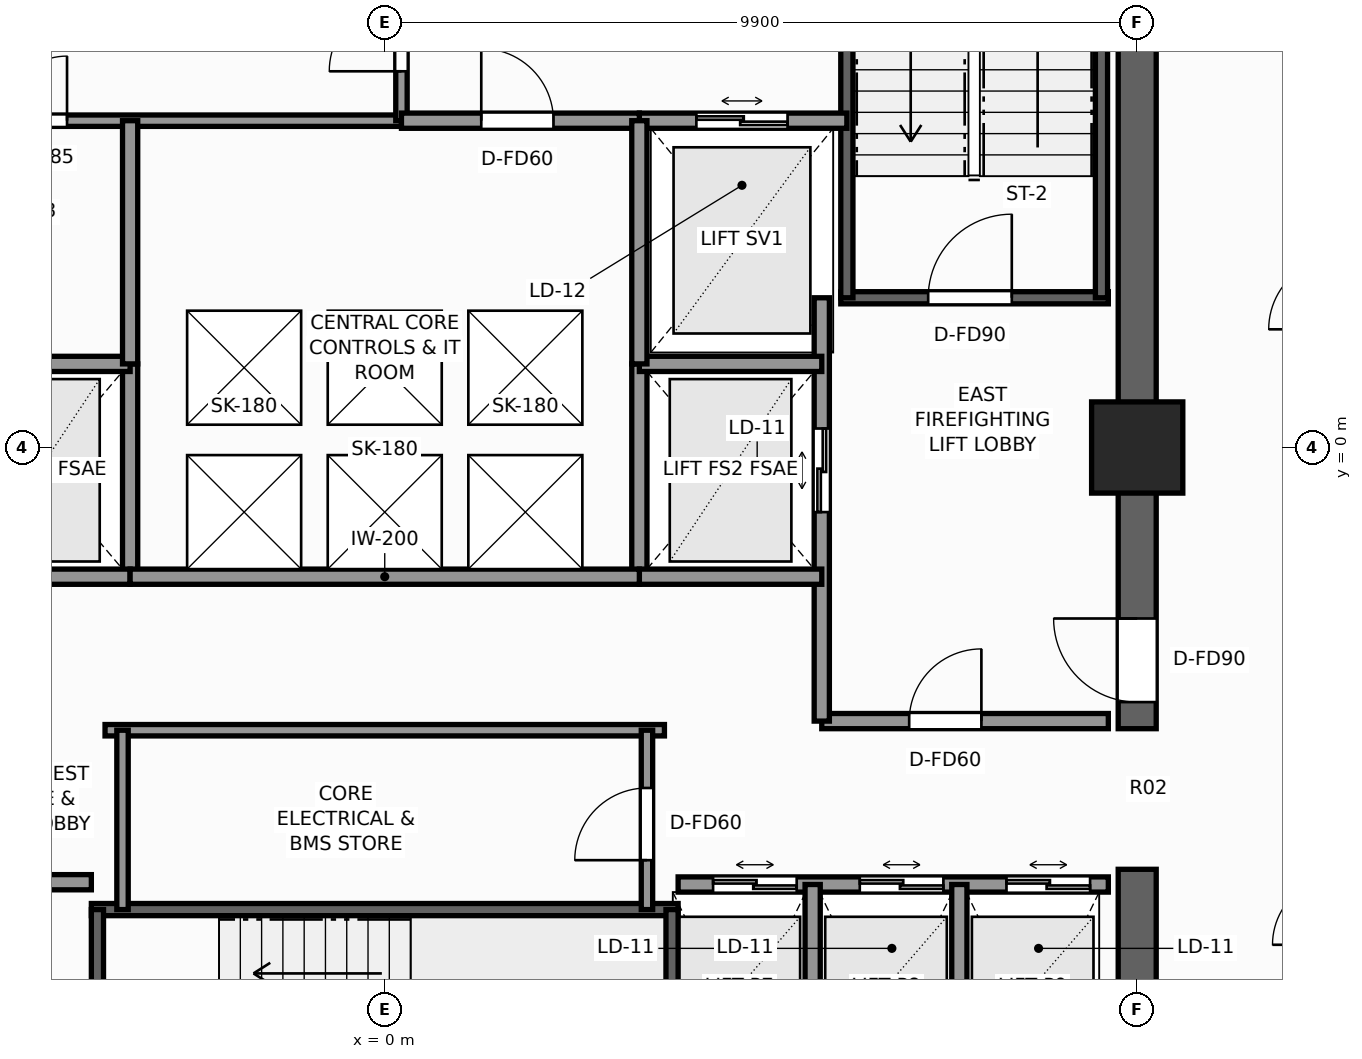
"""IFC4 building model, lengths in metres.
Left out: names, types, materials, properties, quantities, classifications, styles, units other than length and angle.
Written with IfcOpenShell. Run it as: python <this file> out.ifc"""

import sys

from ifc_helpers import new_model, si_unit, direction, frame, frame_2d, origin, origin_2d, place, context, subcontext, project, spatial, rectangle, extrude, element, fill, save


model = new_model("IFC4")
c1 = context("Model", 3, precision=1e-05, world=origin(), true_north=direction((0.0, 1.0)))
c2 = subcontext(c1, "Body", "Model", "MODEL_VIEW")
j1 = project(units=[si_unit("LENGTHUNIT", "METRE"), si_unit("PLANEANGLEUNIT", "RADIAN")], contexts=[c1])
p1 = place(None, origin())
s1 = spatial("IfcSite", under=j1, at=p1, CompositionType="ELEMENT")
p2 = place(p1, origin())
s2 = spatial("IfcBuilding", under=s1, at=p2, CompositionType="ELEMENT")
p3 = place(p2, frame((0.0, 0.0, 189.9)))
s3 = spatial("IfcBuildingStorey", under=s2, at=p3, CompositionType="ELEMENT", Elevation=189.9)
p4 = place(p3, frame((9.9, -9.65, 0.0), z_axis=(0.0, 0.0, 1.0), x_axis=(0.0, 1.0, 0.0)))
e1 = element("IfcWall", 1, at=p4, inside=s3, PredefinedType="SHEAR", context=c2, shape_type="SweptSolid", body=[
    extrude(rectangle(XDim=4.1, YDim=0.5, at=frame_2d((2.05, 0.0))), origin(), (0.0, 0.0, 1.0), 3.3),
])
p5 = place(p3, frame((9.9, -3.7, 0.0), z_axis=(0.0, 0.0, 1.0), x_axis=(0.0, 1.0, 0.0)))
e2 = element("IfcWall", 2, at=p5, inside=s3, PredefinedType="SHEAR", context=c2, shape_type="SweptSolid", body=[
    extrude(rectangle(XDim=13.35, YDim=0.5, at=frame_2d((6.675, 0.0))), origin(), (0.0, 0.0, 1.0), 3.3),
])
p6 = place(p5, frame((0.35, 0.0, 0.0)))
e3 = element("IfcOpeningElement", 3, at=p6, cuts=e2, PredefinedType="OPENING", context=c2, shape_type="SweptSolid", body=[
    extrude(rectangle(XDim=1.1, YDim=2.2, at=frame_2d((0.55, 1.1))), frame((0.0, 0.26, 0.0), z_axis=(0.0, -1.0, 0.0), x_axis=(1.0, 0.0, 0.0)), (0.0, 0.0, 1.0), 0.52),
])
p7 = place(p3, frame((9.9, 0.0, 0.0), z_axis=(0.0, 0.0, 1.0), x_axis=(1.0, 0.0, 0.0)))
e4 = element("IfcColumn", 4, at=p7, inside=s3, PredefinedType="COLUMN", context=c2, shape_type="SweptSolid", body=[
    extrude(rectangle(XDim=1.2, YDim=1.2, at=origin_2d()), origin(), (0.0, 0.0, 1.0), 3.3),
])
p8 = place(p3, frame((6.0, 1.97, 0.0), z_axis=(0.0, 0.0, 1.0), x_axis=(1.0, 0.0, 0.0)))
e5 = element("IfcWall", 5, at=p8, inside=s3, PredefinedType="SHEAR", context=c2, shape_type="SweptSolid", body=[
    extrude(rectangle(XDim=3.52, YDim=0.16, at=frame_2d((1.76, 0.0))), origin(), (0.0, 0.0, 1.0), 3.3),
])
p9 = place(p8, frame((1.15, 0.0, 0.0)))
e6 = element("IfcOpeningElement", 6, at=p9, cuts=e5, PredefinedType="OPENING", context=c2, shape_type="SweptSolid", body=[
    extrude(rectangle(XDim=1.1, YDim=2.2, at=frame_2d((0.55, 1.1))), frame((0.0, 0.09, 0.0), z_axis=(0.0, -1.0, 0.0), x_axis=(1.0, 0.0, 0.0)), (0.0, 0.0, 1.0), 0.18),
])
for number, where, z_axis, x_axis in (
    (7, (6.08, 1.97, 0.0), (0.0, 0.0, 1.0), (0.0, 1.0, 0.0)),
    (8, (9.43, 1.97, 0.0), (0.0, 0.0, 1.0), (0.0, 1.0, 0.0)),
):
    element("IfcWall", number, at=place(p3, frame(where, z_axis=z_axis, x_axis=x_axis)), inside=s3, PredefinedType="SHEAR", context=c2, shape_type="SweptSolid", body=[
        extrude(rectangle(XDim=7.56, YDim=0.16, at=frame_2d((3.78, 0.0))), origin(), (0.0, 0.0, 1.0), 3.3),
    ])
p10 = place(p3, frame((-3.86, -6.08, 0.0), z_axis=(0.0, 0.0, 1.0), x_axis=(1.0, 0.0, 0.0)))
e9 = element("IfcWall", 9, at=p10, inside=s3, PredefinedType="SHEAR", context=c2, shape_type="SweptSolid", body=[
    extrude(rectangle(XDim=7.72, YDim=0.16, at=frame_2d((3.86, 0.0))), origin(), (0.0, 0.0, 1.0), 3.3),
])
for number, where, z_axis, x_axis in (
    (10, (-3.78, -9.43, 0.0), (0.0, 0.0, 1.0), (0.0, 1.0, 0.0)),
    (11, (3.78, -9.43, 0.0), (0.0, 0.0, 1.0), (0.0, 1.0, 0.0)),
):
    element("IfcWall", number, at=place(p3, frame(where, z_axis=z_axis, x_axis=x_axis)), inside=s3, PredefinedType="SHEAR", context=c2, shape_type="SweptSolid", body=[
        extrude(rectangle(XDim=3.35, YDim=0.16, at=frame_2d((1.675, 0.0))), origin(), (0.0, 0.0, 1.0), 3.3),
    ])
p11 = place(p3, frame((-3.35, -1.7, 0.0), z_axis=(0.0, 0.0, 1.0), x_axis=(0.0, 1.0, 0.0)))
e12 = element("IfcWall", 12, at=p11, inside=s3, PredefinedType="SOLIDWALL", context=c2, shape_type="SweptSolid", body=[
    extrude(rectangle(XDim=2.8, YDim=0.2, at=frame_2d((1.4, 0.0))), origin(), (0.0, 0.0, 1.0), 2.715),
])
for number, where, z_axis, x_axis in (
    (13, (-5.75, -1.7, 0.0), (0.0, 0.0, 1.0), (1.0, 0.0, 0.0)),
    (14, (-5.75, 1.1, 0.0), (0.0, 0.0, 1.0), (1.0, 0.0, 0.0)),
):
    element("IfcWall", number, at=place(p3, frame(where, z_axis=z_axis, x_axis=x_axis)), inside=s3, PredefinedType="SOLIDWALL", context=c2, shape_type="SweptSolid", body=[
        extrude(rectangle(XDim=2.4, YDim=0.2, at=frame_2d((1.2, 0.0))), origin(), (0.0, 0.0, 1.0), 3.08),
    ])
p12 = place(p3, frame((5.75, -3.6, 0.0), z_axis=(0.0, 0.0, 1.0), x_axis=(1.0, 0.0, 0.0)))
e15 = element("IfcWall", 15, at=p12, inside=s3, PredefinedType="SOLIDWALL", context=c2, shape_type="SweptSolid", body=[
    extrude(rectangle(XDim=3.77, YDim=0.2, at=frame_2d((1.885, 0.0))), origin(), (0.0, 0.0, 1.0), 3.08),
])
p13 = place(p12, frame((1.15, 0.0, 0.0)))
e16 = element("IfcOpeningElement", 16, at=p13, cuts=e15, PredefinedType="OPENING", context=c2, shape_type="SweptSolid", body=[
    extrude(rectangle(XDim=0.95, YDim=2.06, at=frame_2d((0.475, 1.03))), frame((0.0, 0.11, 0.0), z_axis=(0.0, -1.0, 0.0), x_axis=(1.0, 0.0, 0.0)), (0.0, 0.0, 1.0), 0.22),
])
p14 = place(p3, frame((5.75, -3.6, 0.0), z_axis=(0.0, 0.0, 1.0), x_axis=(0.0, 1.0, 0.0)))
e17 = element("IfcWall", 17, at=p14, inside=s3, PredefinedType="SOLIDWALL", context=c2, shape_type="SweptSolid", body=[
    extrude(rectangle(XDim=5.57, YDim=0.2, at=frame_2d((2.785, 0.0))), origin(), (0.0, 0.0, 1.0), 2.715),
])
p15 = place(p14, frame((2.75, 0.0, 0.0)))
e18 = element("IfcOpeningElement", 18, at=p15, cuts=e17, PredefinedType="OPENING", context=c2, shape_type="SweptSolid", body=[
    extrude(rectangle(XDim=1.1, YDim=2.2, at=frame_2d((0.55, 1.1))), frame((0.0, 0.11, 0.0), z_axis=(0.0, -1.0, 0.0), x_axis=(1.0, 0.0, 0.0)), (0.0, 0.0, 1.0), 0.22),
])
p16 = place(p3, frame((3.35, -1.7, 0.0), z_axis=(0.0, 0.0, 1.0), x_axis=(0.0, 1.0, 0.0)))
e19 = element("IfcWall", 19, at=p16, inside=s3, PredefinedType="SOLIDWALL", context=c2, shape_type="SweptSolid", body=[
    extrude(rectangle(XDim=2.8, YDim=0.2, at=frame_2d((1.4, 0.0))), origin(), (0.0, 0.0, 1.0), 2.715),
])
for number, where, z_axis, x_axis in (
    (20, (3.35, -1.7, 0.0), (0.0, 0.0, 1.0), (1.0, 0.0, 0.0)),
    (21, (3.35, 1.1, 0.0), (0.0, 0.0, 1.0), (1.0, 0.0, 0.0)),
):
    element("IfcWall", number, at=place(p3, frame(where, z_axis=z_axis, x_axis=x_axis)), inside=s3, PredefinedType="SOLIDWALL", context=c2, shape_type="SweptSolid", body=[
        extrude(rectangle(XDim=2.4, YDim=0.2, at=frame_2d((1.2, 0.0))), origin(), (0.0, 0.0, 1.0), 3.08),
    ])
p17 = place(p3, frame((3.35, 4.3, 0.0), z_axis=(0.0, 0.0, 1.0), x_axis=(1.0, 0.0, 0.0)))
e22 = element("IfcWall", 22, at=p17, inside=s3, PredefinedType="SOLIDWALL", context=c2, shape_type="SweptSolid", body=[
    extrude(rectangle(XDim=2.73, YDim=0.2, at=frame_2d((1.365, 0.0))), origin(), (0.0, 0.0, 1.0), 3.08),
])
p18 = place(p17, frame((0.75, 0.0, 0.0)))
e23 = element("IfcOpeningElement", 23, at=p18, cuts=e22, PredefinedType="OPENING", context=c2, shape_type="SweptSolid", body=[
    extrude(rectangle(XDim=1.2, YDim=2.25, at=frame_2d((0.6, 1.125))), frame((0.0, 0.11, 0.0), z_axis=(0.0, -1.0, 0.0), x_axis=(1.0, 0.0, 0.0)), (0.0, 0.0, 1.0), 0.22),
])
p19 = place(p3, frame((-6.08, 4.3, 0.0), z_axis=(0.0, 0.0, 1.0), x_axis=(1.0, 0.0, 0.0)))
e24 = element("IfcWall", 24, at=p19, inside=s3, PredefinedType="PARTITIONING", context=c2, shape_type="SweptSolid", body=[
    extrude(rectangle(XDim=6.3, YDim=0.15, at=frame_2d((3.15, 0.0))), origin(), (0.0, 0.0, 1.0), 3.08),
])
p20 = place(p19, frame((1.05, 0.0, 0.0)))
e25 = element("IfcOpeningElement", 25, at=p20, cuts=e24, PredefinedType="OPENING", context=c2, shape_type="SweptSolid", body=[
    extrude(rectangle(XDim=0.85, YDim=2.03, at=frame_2d((0.425, 1.015))), frame((0.0, 0.085, 0.0), z_axis=(0.0, -1.0, 0.0), x_axis=(1.0, 0.0, 0.0)), (0.0, 0.0, 1.0), 0.17),
])
p21 = place(p3, frame((0.22, 4.3, 0.0), z_axis=(0.0, 0.0, 1.0), x_axis=(0.0, 1.0, 0.0)))
e26 = element("IfcWall", 26, at=p21, inside=s3, PredefinedType="PARTITIONING", context=c2, shape_type="SweptSolid", body=[
    extrude(rectangle(XDim=5.22, YDim=0.15, at=frame_2d((2.61, 0.0))), origin(), (0.0, 0.0, 1.0), 3.08),
])
p22 = place(p21, frame((0.65, 0.0, 0.0)))
e27 = element("IfcOpeningElement", 27, at=p22, cuts=e26, PredefinedType="OPENING", context=c2, shape_type="SweptSolid", body=[
    extrude(rectangle(XDim=0.95, YDim=2.06, at=frame_2d((0.475, 1.03))), frame((0.0, 0.085, 0.0), z_axis=(0.0, -1.0, 0.0), x_axis=(1.0, 0.0, 0.0)), (0.0, 0.0, 1.0), 0.17),
])
p23 = place(p3, frame((-9.52, -5.72, 0.0), z_axis=(0.0, 0.0, 1.0), x_axis=(1.0, 0.0, 0.0)))
e28 = element("IfcWall", 28, at=p23, inside=s3, PredefinedType="SOLIDWALL", context=c2, shape_type="SweptSolid", body=[
    extrude(rectangle(XDim=5.66, YDim=0.2, at=frame_2d((2.83, 0.0))), origin(), (0.0, 0.0, 1.0), 3.08),
])
p24 = place(p23, frame((1.8, 0.0, 0.0)))
e29 = element("IfcOpeningElement", 29, at=p24, cuts=e28, PredefinedType="OPENING", context=c2, shape_type="SweptSolid", body=[
    extrude(rectangle(XDim=0.95, YDim=2.06, at=frame_2d((0.475, 1.03))), frame((0.0, 0.11, 0.0), z_axis=(0.0, -1.0, 0.0), x_axis=(1.0, 0.0, 0.0)), (0.0, 0.0, 1.0), 0.22),
])
p25 = place(p3, frame((3.86, -5.75, 0.0), z_axis=(0.0, 0.0, 1.0), x_axis=(1.0, 0.0, 0.0)))
e30 = element("IfcWall", 30, at=p25, inside=s3, PredefinedType="SOLIDWALL", context=c2, shape_type="SweptSolid", body=[
    extrude(rectangle(XDim=5.66, YDim=0.2, at=frame_2d((2.83, 0.0))), origin(), (0.0, 0.0, 1.0), 3.08),
])
p26 = place(p25, frame((0.46, 0.0, 0.0)))
e31 = element("IfcOpeningElement", 31, at=p26, cuts=e30, PredefinedType="OPENING", context=c2, shape_type="SweptSolid", body=[
    extrude(rectangle(XDim=1.1, YDim=2.2, at=frame_2d((0.55, 1.1))), frame((0.0, 0.11, 0.0), z_axis=(0.0, -1.0, 0.0), x_axis=(1.0, 0.0, 0.0)), (0.0, 0.0, 1.0), 0.22),
])
p27 = place(p25, frame((2.39, 0.0, 0.0)))
e32 = element("IfcOpeningElement", 32, at=p27, cuts=e30, PredefinedType="OPENING", context=c2, shape_type="SweptSolid", body=[
    extrude(rectangle(XDim=1.1, YDim=2.2, at=frame_2d((0.55, 1.1))), frame((0.0, 0.11, 0.0), z_axis=(0.0, -1.0, 0.0), x_axis=(1.0, 0.0, 0.0)), (0.0, 0.0, 1.0), 0.22),
])
p28 = place(p25, frame((4.32, 0.0, 0.0)))
e33 = element("IfcOpeningElement", 33, at=p28, cuts=e30, PredefinedType="OPENING", context=c2, shape_type="SweptSolid", body=[
    extrude(rectangle(XDim=1.1, YDim=2.2, at=frame_2d((0.55, 1.1))), frame((0.0, 0.11, 0.0), z_axis=(0.0, -1.0, 0.0), x_axis=(1.0, 0.0, 0.0)), (0.0, 0.0, 1.0), 0.22),
])
for number, where, z_axis, x_axis in (
    (34, (5.63, -9.52, 0.0), (0.0, 0.0, 1.0), (0.0, 1.0, 0.0)),
    (35, (7.56, -9.52, 0.0), (0.0, 0.0, 1.0), (0.0, 1.0, 0.0)),
):
    element("IfcWall", number, at=place(p3, frame(where, z_axis=z_axis, x_axis=x_axis)), inside=s3, PredefinedType="SOLIDWALL", context=c2, shape_type="SweptSolid", body=[
        extrude(rectangle(XDim=3.77, YDim=0.2, at=frame_2d((1.885, 0.0))), origin(), (0.0, 0.0, 1.0), 3.08),
    ])
p29 = place(p3, frame((0.22, 4.3, 0.0), z_axis=(0.0, 0.0, 1.0), x_axis=(1.0, 0.0, 0.0)))
e36 = element("IfcWall", 36, at=p29, inside=s3, PredefinedType="SOLIDWALL", context=c2, shape_type="SweptSolid", body=[
    extrude(rectangle(XDim=3.13, YDim=0.2, at=frame_2d((1.565, 0.0))), origin(), (0.0, 0.0, 1.0), 3.08),
])
p30 = place(p29, frame((1.05, 0.0, 0.0)))
e37 = element("IfcOpeningElement", 37, at=p30, cuts=e36, PredefinedType="OPENING", context=c2, shape_type="SweptSolid", body=[
    extrude(rectangle(XDim=0.95, YDim=2.06, at=frame_2d((0.475, 1.03))), frame((0.0, 0.11, 0.0), z_axis=(0.0, -1.0, 0.0), x_axis=(1.0, 0.0, 0.0)), (0.0, 0.0, 1.0), 0.22),
])
p31 = place(p3, frame((-3.35, -1.7, 0.0), z_axis=(0.0, 0.0, 1.0), x_axis=(1.0, 0.0, 0.0)))
e38 = element("IfcWall", 38, at=p31, inside=s3, PredefinedType="SOLIDWALL", context=c2, shape_type="SweptSolid", body=[
    extrude(rectangle(XDim=6.7, YDim=0.2, at=frame_2d((3.35, 0.0))), origin(), (0.0, 0.0, 1.0), 2.715),
])
for number, where, z_axis, x_axis in (
    (39, (-3.35, 1.1, 0.0), (0.0, 0.0, 1.0), (0.0, 1.0, 0.0)),
    (40, (3.35, 1.1, 0.0), (0.0, 0.0, 1.0), (0.0, 1.0, 0.0)),
):
    element("IfcWall", number, at=place(p3, frame(where, z_axis=z_axis, x_axis=x_axis)), inside=s3, PredefinedType="SOLIDWALL", context=c2, shape_type="SweptSolid", body=[
        extrude(rectangle(XDim=3.2, YDim=0.2, at=frame_2d((1.6, 0.0))), origin(), (0.0, 0.0, 1.0), 2.715),
    ])
p32 = place(p3, frame((-3.68, -3.72, 0.0), z_axis=(0.0, 0.0, 1.0), x_axis=(1.0, 0.0, 0.0)))
e41 = element("IfcWall", 41, at=p32, inside=s3, PredefinedType="PARTITIONING", context=c2, shape_type="SweptSolid", body=[
    extrude(rectangle(XDim=7.36, YDim=0.15, at=frame_2d((3.68, 0.0))), origin(), (0.0, 0.0, 1.0), 3.08),
])
p33 = place(p3, frame((3.45, -6.08, 0.0), z_axis=(0.0, 0.0, 1.0), x_axis=(0.0, 1.0, 0.0)))
e42 = element("IfcWall", 42, at=p33, inside=s3, PredefinedType="PARTITIONING", context=c2, shape_type="SweptSolid", body=[
    extrude(rectangle(XDim=2.36, YDim=0.15, at=frame_2d((1.18, 0.0))), origin(), (0.0, 0.0, 1.0), 3.08),
])
p34 = place(p33, frame((0.65, 0.0, 0.0)))
e43 = element("IfcOpeningElement", 43, at=p34, cuts=e42, PredefinedType="OPENING", context=c2, shape_type="SweptSolid", body=[
    extrude(rectangle(XDim=0.95, YDim=2.06, at=frame_2d((0.475, 1.03))), frame((0.0, 0.085, 0.0), z_axis=(0.0, -1.0, 0.0), x_axis=(1.0, 0.0, 0.0)), (0.0, 0.0, 1.0), 0.17),
])
p35 = place(p3, frame((-3.45, -6.08, 0.0), z_axis=(0.0, 0.0, 1.0), x_axis=(0.0, 1.0, 0.0)))
e44 = element("IfcWall", 44, at=p35, inside=s3, PredefinedType="PARTITIONING", context=c2, shape_type="SweptSolid", body=[
    extrude(rectangle(XDim=2.36, YDim=0.15, at=frame_2d((1.18, 0.0))), origin(), (0.0, 0.0, 1.0), 3.08),
])
p36 = place(p3, frame((0.0, 0.0, -0.22)))
p37 = place(p36, frame((-1.85, -0.85, 0.0)))
p38 = place(p37, frame((0.0, 0.0, 0.17)))
e45 = element("IfcWindow", 45, at=p38, inside=s3, PartitioningType="SINGLE_PANEL", PredefinedType="SKYLIGHT", context=c2, shape_type="SweptSolid", body=[
    extrude(rectangle(XDim=1.5, YDim=1.5, at=origin_2d()), origin(), (0.0, 0.0, 1.0), 0.05),
])
p39 = place(p36, frame((0.0, -0.85, 0.0)))
p40 = place(p39, frame((0.0, 0.0, 0.17)))
e46 = element("IfcWindow", 46, at=p40, inside=s3, PartitioningType="SINGLE_PANEL", PredefinedType="SKYLIGHT", context=c2, shape_type="SweptSolid", body=[
    extrude(rectangle(XDim=1.5, YDim=1.5, at=origin_2d()), origin(), (0.0, 0.0, 1.0), 0.05),
])
p41 = place(p36, frame((1.85, -0.85, 0.0)))
p42 = place(p41, frame((0.0, 0.0, 0.17)))
e47 = element("IfcWindow", 47, at=p42, inside=s3, PartitioningType="SINGLE_PANEL", PredefinedType="SKYLIGHT", context=c2, shape_type="SweptSolid", body=[
    extrude(rectangle(XDim=1.5, YDim=1.5, at=origin_2d()), origin(), (0.0, 0.0, 1.0), 0.05),
])
p43 = place(p36, frame((-1.85, 1.05, 0.0)))
p44 = place(p43, frame((0.0, 0.0, 0.17)))
e48 = element("IfcWindow", 48, at=p44, inside=s3, PartitioningType="SINGLE_PANEL", PredefinedType="SKYLIGHT", context=c2, shape_type="SweptSolid", body=[
    extrude(rectangle(XDim=1.5, YDim=1.5, at=origin_2d()), origin(), (0.0, 0.0, 1.0), 0.05),
])
p45 = place(p36, frame((0.0, 1.05, 0.0)))
p46 = place(p45, frame((0.0, 0.0, 0.17)))
e49 = element("IfcWindow", 49, at=p46, inside=s3, PartitioningType="SINGLE_PANEL", PredefinedType="SKYLIGHT", context=c2, shape_type="SweptSolid", body=[
    extrude(rectangle(XDim=1.5, YDim=1.5, at=origin_2d()), origin(), (0.0, 0.0, 1.0), 0.05),
])
p47 = place(p36, frame((1.85, 1.05, 0.0)))
p48 = place(p47, frame((0.0, 0.0, 0.17)))
e50 = element("IfcWindow", 50, at=p48, inside=s3, PartitioningType="SINGLE_PANEL", PredefinedType="SKYLIGHT", context=c2, shape_type="SweptSolid", body=[
    extrude(rectangle(XDim=1.5, YDim=1.5, at=origin_2d()), origin(), (0.0, 0.0, 1.0), 0.05),
])
p49 = place(p9, origin())
e51 = element("IfcDoor", 51, at=p49, inside=s3, OperationType="SINGLE_SWING_RIGHT", PredefinedType="DOOR", context=c2, shape_type="SweptSolid", body=[
    extrude(rectangle(XDim=1.1, YDim=2.2, at=frame_2d((0.55, 1.1))), frame((0.0, 0.025, 0.0), z_axis=(0.0, -1.0, 0.0), x_axis=(1.0, 0.0, 0.0)), (0.0, 0.0, 1.0), 0.05),
])
fill(e6, e51)
p50 = place(p6, origin())
e52 = element("IfcDoor", 52, at=p50, inside=s3, OperationType="SINGLE_SWING_RIGHT", PredefinedType="DOOR", context=c2, shape_type="SweptSolid", body=[
    extrude(rectangle(XDim=1.1, YDim=2.2, at=frame_2d((0.55, 1.1))), frame((0.0, 0.025, 0.0), z_axis=(0.0, -1.0, 0.0), x_axis=(1.0, 0.0, 0.0)), (0.0, 0.0, 1.0), 0.05),
])
fill(e3, e52)
p51 = place(p15, origin())
e53 = element("IfcDoor", 53, at=p51, inside=s3, OperationType="DOUBLE_DOOR_SLIDING", PredefinedType="DOOR", context=c2, shape_type="SweptSolid", body=[
    extrude(rectangle(XDim=1.1, YDim=2.2, at=frame_2d((0.55, 1.1))), frame((0.0, 0.025, 0.0), z_axis=(0.0, -1.0, 0.0), x_axis=(1.0, 0.0, 0.0)), (0.0, 0.0, 1.0), 0.05),
])
fill(e18, e53)
p52 = place(p18, origin())
e54 = element("IfcDoor", 54, at=p52, inside=s3, OperationType="DOUBLE_DOOR_SLIDING", PredefinedType="DOOR", context=c2, shape_type="SweptSolid", body=[
    extrude(rectangle(XDim=1.2, YDim=2.25, at=frame_2d((0.6, 1.125))), frame((0.0, 0.025, 0.0), z_axis=(0.0, -1.0, 0.0), x_axis=(1.0, 0.0, 0.0)), (0.0, 0.0, 1.0), 0.05),
])
fill(e23, e54)
p53 = place(p22, origin())
e55 = element("IfcDoor", 55, at=p53, inside=s3, OperationType="SINGLE_SWING_LEFT", PredefinedType="DOOR", context=c2, shape_type="SweptSolid", body=[
    extrude(rectangle(XDim=0.95, YDim=2.06, at=frame_2d((0.475, 1.03))), frame((0.0, 0.025, 0.0), z_axis=(0.0, -1.0, 0.0), x_axis=(1.0, 0.0, 0.0)), (0.0, 0.0, 1.0), 0.05),
])
fill(e27, e55)
p54 = place(p26, origin())
e56 = element("IfcDoor", 56, at=p54, inside=s3, OperationType="DOUBLE_DOOR_SLIDING", PredefinedType="DOOR", context=c2, shape_type="SweptSolid", body=[
    extrude(rectangle(XDim=1.1, YDim=2.2, at=frame_2d((0.55, 1.1))), frame((0.0, 0.025, 0.0), z_axis=(0.0, -1.0, 0.0), x_axis=(1.0, 0.0, 0.0)), (0.0, 0.0, 1.0), 0.05),
])
fill(e31, e56)
p55 = place(p27, origin())
e57 = element("IfcDoor", 57, at=p55, inside=s3, OperationType="DOUBLE_DOOR_SLIDING", PredefinedType="DOOR", context=c2, shape_type="SweptSolid", body=[
    extrude(rectangle(XDim=1.1, YDim=2.2, at=frame_2d((0.55, 1.1))), frame((0.0, 0.025, 0.0), z_axis=(0.0, -1.0, 0.0), x_axis=(1.0, 0.0, 0.0)), (0.0, 0.0, 1.0), 0.05),
])
fill(e32, e57)
p56 = place(p28, origin())
e58 = element("IfcDoor", 58, at=p56, inside=s3, OperationType="DOUBLE_DOOR_SLIDING", PredefinedType="DOOR", context=c2, shape_type="SweptSolid", body=[
    extrude(rectangle(XDim=1.1, YDim=2.2, at=frame_2d((0.55, 1.1))), frame((0.0, 0.025, 0.0), z_axis=(0.0, -1.0, 0.0), x_axis=(1.0, 0.0, 0.0)), (0.0, 0.0, 1.0), 0.05),
])
fill(e33, e58)
p57 = place(p13, origin())
e59 = element("IfcDoor", 59, at=p57, inside=s3, OperationType="SINGLE_SWING_RIGHT", PredefinedType="DOOR", context=c2, shape_type="SweptSolid", body=[
    extrude(rectangle(XDim=0.95, YDim=2.06, at=frame_2d((0.475, 1.03))), frame((0.0, 0.025, 0.0), z_axis=(0.0, -1.0, 0.0), x_axis=(1.0, 0.0, 0.0)), (0.0, 0.0, 1.0), 0.05),
])
fill(e16, e59)
p58 = place(p30, origin())
e60 = element("IfcDoor", 60, at=p58, inside=s3, OperationType="SINGLE_SWING_LEFT", PredefinedType="DOOR", context=c2, shape_type="SweptSolid", body=[
    extrude(rectangle(XDim=0.95, YDim=2.06, at=frame_2d((0.475, 1.03))), frame((0.0, 0.025, 0.0), z_axis=(0.0, -1.0, 0.0), x_axis=(1.0, 0.0, 0.0)), (0.0, 0.0, 1.0), 0.05),
])
fill(e37, e60)
p59 = place(p34, origin())
e61 = element("IfcDoor", 61, at=p59, inside=s3, OperationType="SINGLE_SWING_LEFT", PredefinedType="DOOR", context=c2, shape_type="SweptSolid", body=[
    extrude(rectangle(XDim=0.95, YDim=2.06, at=frame_2d((0.475, 1.03))), frame((0.0, 0.025, 0.0), z_axis=(0.0, -1.0, 0.0), x_axis=(1.0, 0.0, 0.0)), (0.0, 0.0, 1.0), 0.05),
])
fill(e43, e61)
p60 = place(p20, origin())
e62 = element("IfcDoor", 62, at=p60, inside=s3, OperationType="SINGLE_SWING_RIGHT", PredefinedType="DOOR", context=c2, shape_type="SweptSolid", body=[
    extrude(rectangle(XDim=0.85, YDim=2.03, at=frame_2d((0.425, 1.015))), frame((0.0, 0.025, 0.0), z_axis=(0.0, -1.0, 0.0), x_axis=(1.0, 0.0, 0.0)), (0.0, 0.0, 1.0), 0.05),
])
fill(e25, e62)
save(model, sys.argv[1])
